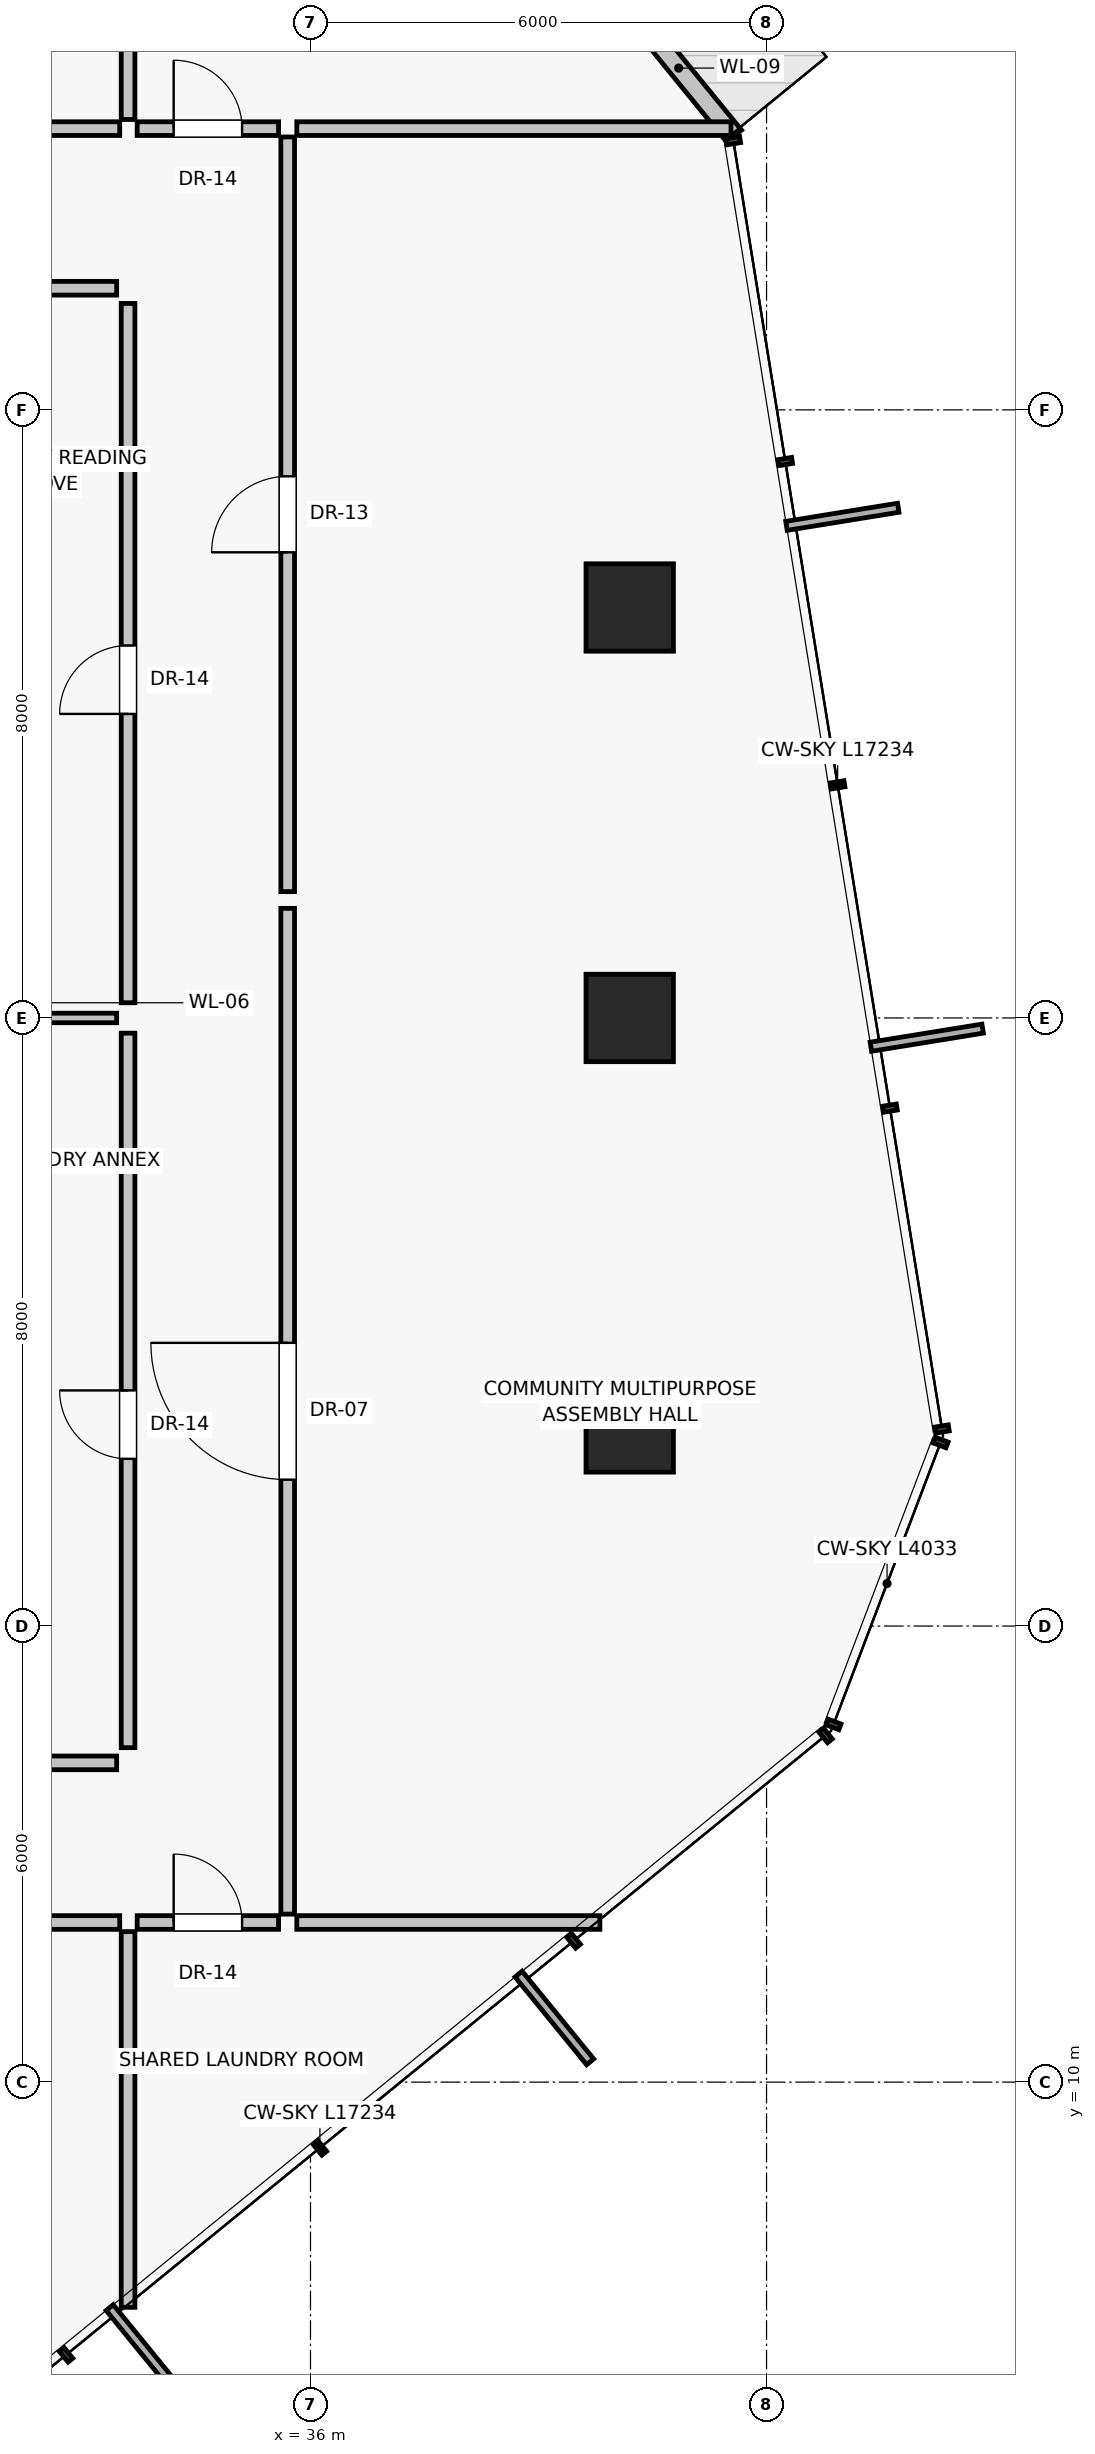
"""IFC4 building model, lengths in metres.
Left out: names, types, materials, properties, quantities, classifications, styles, units other than length and angle.
Written with IfcOpenShell. Run it as: python <this file> out.ifc"""

import sys

from ifc_helpers import new_model, si_unit, direction, frame, frame_2d, origin, origin_2d, place, context, subcontext, project, spatial, rectangle, extrude, source, transform, mapped, element, fill, save


model = new_model("IFC4")
c1 = context("Model", 3, precision=1e-05, world=origin(), true_north=direction((0.0, 1.0)))
c2 = subcontext(c1, "Body", "Model", "MODEL_VIEW")
j1 = project(units=[si_unit("LENGTHUNIT", "METRE"), si_unit("PLANEANGLEUNIT", "RADIAN")], contexts=[c1])
p1 = place(None, origin())
s1 = spatial("IfcSite", under=j1, at=p1, CompositionType="ELEMENT")
p2 = place(p1, origin())
s2 = spatial("IfcBuilding", under=s1, at=p2, CompositionType="ELEMENT")
p3 = place(p2, frame((0.0, 0.0, 158.75)))
s3 = spatial("IfcBuildingStorey", under=s2, at=p3, CompositionType="ELEMENT", Elevation=158.75)
for number, where, z_axis, x_axis in (
    (1, (40.2, 18.6, 0.0), (0.0, 0.0, 1.0), (1.0, 0.0, 0.0)),
    (2, (40.2, 24.0, 0.0), (0.0, 0.0, 1.0), (1.0, 0.0, 0.0)),
    (3, (40.2, 29.4, 0.0), (0.0, 0.0, 1.0), (1.0, 0.0, 0.0)),
):
    element("IfcColumn", number, at=place(p3, frame(where, z_axis=z_axis, x_axis=x_axis)), inside=s3, PredefinedType="COLUMN", context=c2, shape_type="SweptSolid", body=[
        extrude(rectangle(XDim=1.15, YDim=1.15, at=origin_2d()), origin(), (0.0, 0.0, 1.0), 4.3),
    ])
p4 = place(p3, frame((41.574, 35.602, 0.0), z_axis=(0.0, 0.0, 1.0), x_axis=(-0.632059289804, 0.774920030824, 0.0)))
e4 = element("IfcWall", 4, at=p4, inside=s3, PredefinedType="SOLIDWALL", context=c2, shape_type="SweptSolid", body=[
    extrude(rectangle(XDim=4.233, YDim=0.25, at=frame_2d((2.117, 0.0))), origin(), (0.0, 0.0, 1.0), 4.05),
])
p5 = place(p4, frame((2.56, 0.0, 0.0)))
e5 = element("IfcOpeningElement", 5, at=p5, cuts=e4, PredefinedType="OPENING", context=c2, shape_type="SweptSolid", body=[
    extrude(rectangle(XDim=1.15, YDim=2.25, at=frame_2d((0.575, 1.125))), frame((0.0, 0.135, 0.0), z_axis=(0.0, -1.0, 0.0), x_axis=(1.0, 0.0, 0.0)), (0.0, 0.0, 1.0), 0.27),
])
p6 = place(p3, frame((33.6, 14.4, 0.0), z_axis=(0.0, 0.0, 1.0), x_axis=(0.0, 1.0, 0.0)))
e6 = element("IfcWall", 6, at=p6, inside=s3, PredefinedType="PARTITIONING", context=c2, shape_type="SweptSolid", body=[
    extrude(rectangle(XDim=9.4, YDim=0.18, at=frame_2d((4.7, 0.0))), origin(), (0.0, 0.0, 1.0), 4.05),
])
p7 = place(p6, frame((3.8, 0.0, 0.0)))
e7 = element("IfcOpeningElement", 7, at=p7, cuts=e6, PredefinedType="OPENING", context=c2, shape_type="SweptSolid", body=[
    extrude(rectangle(XDim=0.9, YDim=2.01, at=frame_2d((0.45, 1.005))), frame((0.0, 0.1, 0.0), z_axis=(0.0, -1.0, 0.0), x_axis=(1.0, 0.0, 0.0)), (0.0, 0.0, 1.0), 0.2),
])
p8 = place(p3, frame((33.6, 24.2, 0.0), z_axis=(0.0, 0.0, 1.0), x_axis=(0.0, 1.0, 0.0)))
e8 = element("IfcWall", 8, at=p8, inside=s3, PredefinedType="PARTITIONING", context=c2, shape_type="SweptSolid", body=[
    extrude(rectangle(XDim=9.2, YDim=0.18, at=frame_2d((4.6, 0.0))), origin(), (0.0, 0.0, 1.0), 4.05),
])
p9 = place(p8, frame((3.8, 0.0, 0.0)))
e9 = element("IfcOpeningElement", 9, at=p9, cuts=e8, PredefinedType="OPENING", context=c2, shape_type="SweptSolid", body=[
    extrude(rectangle(XDim=0.9, YDim=2.01, at=frame_2d((0.45, 1.005))), frame((0.0, 0.1, 0.0), z_axis=(0.0, -1.0, 0.0), x_axis=(1.0, 0.0, 0.0)), (0.0, 0.0, 1.0), 0.2),
])
p10 = place(p3, frame((31.35, 24.0, 0.0), z_axis=(0.0, 0.0, 1.0), x_axis=(1.0, 0.0, 0.0)))
e10 = element("IfcWall", 10, at=p10, inside=s3, PredefinedType="PARTITIONING", context=c2, shape_type="SweptSolid", body=[
    extrude(rectangle(XDim=2.1, YDim=0.125, at=frame_2d((1.05, 0.0))), origin(), (0.0, 0.0, 1.0), 4.05),
])
for number, where, z_axis, x_axis in (
    (11, (30.9, 14.2, 0.0), (0.0, 0.0, 1.0), (1.0, 0.0, 0.0)),
    (12, (30.9, 33.6, 0.0), (0.0, 0.0, 1.0), (1.0, 0.0, 0.0)),
):
    element("IfcWall", number, at=place(p3, frame(where, z_axis=z_axis, x_axis=x_axis)), inside=s3, PredefinedType="PARTITIONING", context=c2, shape_type="SweptSolid", body=[
        extrude(rectangle(XDim=2.55, YDim=0.18, at=frame_2d((1.275, 0.0))), origin(), (0.0, 0.0, 1.0), 4.05),
    ])
p11 = place(p3, frame((33.6, 11.98, 0.0), z_axis=(0.0, 0.0, 1.0), x_axis=(0.0, -1.0, 0.0)))
e13 = element("IfcWall", 13, at=p11, inside=s3, PredefinedType="PARTITIONING", context=c2, shape_type="SweptSolid", body=[
    extrude(rectangle(XDim=4.942, YDim=0.18, at=frame_2d((2.471, 0.0))), origin(), (0.0, 0.0, 1.0), 4.05),
])
p12 = place(p3, frame((25.454, 12.1, 0.0), z_axis=(0.0, 0.0, 1.0), x_axis=(1.0, 0.0, 0.0)))
e14 = element("IfcWall", 14, at=p12, inside=s3, PredefinedType="PARTITIONING", context=c2, shape_type="SweptSolid", body=[
    extrude(rectangle(XDim=8.036, YDim=0.18, at=frame_2d((4.018, 0.0))), origin(), (0.0, 0.0, 1.0), 3.63),
])
p13 = place(p12, frame((3.518, 0.0, 0.0)))
e15 = element("IfcOpeningElement", 15, at=p13, cuts=e14, PredefinedType="OPENING", context=c2, shape_type="SweptSolid", body=[
    extrude(rectangle(XDim=1.0, YDim=2.01, at=frame_2d((0.5, 1.005))), frame((0.0, 0.1, 0.0), z_axis=(0.0, -1.0, 0.0), x_axis=(1.0, 0.0, 0.0)), (0.0, 0.0, 1.0), 0.2),
])
p14 = place(p3, frame((33.6, 35.82, 0.0), z_axis=(0.0, 0.0, 1.0), x_axis=(0.0, 1.0, 0.0)))
e16 = element("IfcWall", 16, at=p14, inside=s3, PredefinedType="PARTITIONING", context=c2, shape_type="SweptSolid", body=[
    extrude(rectangle(XDim=5.085, YDim=0.18, at=frame_2d((2.542, 0.0))), origin(), (0.0, 0.0, 1.0), 4.05),
])
p15 = place(p3, frame((24.11, 35.7, 0.0), z_axis=(0.0, 0.0, 1.0), x_axis=(1.0, 0.0, 0.0)))
e17 = element("IfcWall", 17, at=p15, inside=s3, PredefinedType="PARTITIONING", context=c2, shape_type="SweptSolid", body=[
    extrude(rectangle(XDim=9.38, YDim=0.18, at=frame_2d((4.69, 0.0))), origin(), (0.0, 0.0, 1.0), 3.63),
])
p16 = place(p15, frame((4.19, 0.0, 0.0)))
e18 = element("IfcOpeningElement", 18, at=p16, cuts=e17, PredefinedType="OPENING", context=c2, shape_type="SweptSolid", body=[
    extrude(rectangle(XDim=1.0, YDim=2.01, at=frame_2d((0.5, 1.005))), frame((0.0, 0.1, 0.0), z_axis=(0.0, -1.0, 0.0), x_axis=(1.0, 0.0, 0.0)), (0.0, 0.0, 1.0), 0.2),
])
p17 = place(p3, frame((35.82, 12.1, 0.0), z_axis=(0.0, 0.0, 1.0), x_axis=(1.0, 0.0, 0.0)))
e19 = element("IfcWall", 19, at=p17, inside=s3, PredefinedType="PARTITIONING", context=c2, shape_type="SweptSolid", body=[
    extrude(rectangle(XDim=3.987, YDim=0.18, at=frame_2d((1.994, 0.0))), origin(), (0.0, 0.0, 1.0), 4.05),
])
p18 = place(p3, frame((35.82, 35.7, 0.0), z_axis=(0.0, 0.0, 1.0), x_axis=(1.0, 0.0, 0.0)))
e20 = element("IfcWall", 20, at=p18, inside=s3, PredefinedType="PARTITIONING", context=c2, shape_type="SweptSolid", body=[
    extrude(rectangle(XDim=5.712, YDim=0.18, at=frame_2d((2.856, 0.0))), origin(), (0.0, 0.0, 1.0), 4.05),
])
p19 = place(p3, frame((35.7, 12.21, 0.0), z_axis=(0.0, 0.0, 1.0), x_axis=(0.0, 1.0, 0.0)))
e21 = element("IfcWall", 21, at=p19, inside=s3, PredefinedType="PARTITIONING", context=c2, shape_type="SweptSolid", body=[
    extrude(rectangle(XDim=13.232, YDim=0.18, at=frame_2d((6.616, 0.0))), origin(), (0.0, 0.0, 1.0), 3.63),
])
p20 = place(p19, frame((5.716, 0.0, 0.0)))
e22 = element("IfcOpeningElement", 22, at=p20, cuts=e21, PredefinedType="OPENING", context=c2, shape_type="SweptSolid", body=[
    extrude(rectangle(XDim=1.8, YDim=2.25, at=frame_2d((0.9, 1.125))), frame((0.0, 0.1, 0.0), z_axis=(0.0, -1.0, 0.0), x_axis=(1.0, 0.0, 0.0)), (0.0, 0.0, 1.0), 0.2),
])
p21 = place(p3, frame((35.7, 25.662, 0.0), z_axis=(0.0, 0.0, 1.0), x_axis=(0.0, 1.0, 0.0)))
e23 = element("IfcWall", 23, at=p21, inside=s3, PredefinedType="PARTITIONING", context=c2, shape_type="SweptSolid", body=[
    extrude(rectangle(XDim=9.928, YDim=0.18, at=frame_2d((4.964, 0.0))), origin(), (0.0, 0.0, 1.0), 3.63),
])
p22 = place(p21, frame((4.464, 0.0, 0.0)))
e24 = element("IfcOpeningElement", 24, at=p22, cuts=e23, PredefinedType="OPENING", context=c2, shape_type="SweptSolid", body=[
    extrude(rectangle(XDim=1.0, YDim=2.01, at=frame_2d((0.5, 1.005))), frame((0.0, 0.1, 0.0), z_axis=(0.0, -1.0, 0.0), x_axis=(1.0, 0.0, 0.0)), (0.0, 0.0, 1.0), 0.2),
])
p23 = place(p3, frame((33.72, 12.1, 0.0), z_axis=(0.0, 0.0, 1.0), x_axis=(1.0, 0.0, 0.0)))
e25 = element("IfcWall", 25, at=p23, inside=s3, PredefinedType="PARTITIONING", context=c2, shape_type="SweptSolid", body=[
    extrude(rectangle(XDim=1.86, YDim=0.18, at=frame_2d((0.93, 0.0))), origin(), (0.0, 0.0, 1.0), 4.05),
])
p24 = place(p23, frame((0.48, 0.0, 0.0)))
e26 = element("IfcOpeningElement", 26, at=p24, cuts=e25, PredefinedType="OPENING", context=c2, shape_type="SweptSolid", body=[
    extrude(rectangle(XDim=0.9, YDim=2.01, at=frame_2d((0.45, 1.005))), frame((0.0, 0.1, 0.0), z_axis=(0.0, -1.0, 0.0), x_axis=(1.0, 0.0, 0.0)), (0.0, 0.0, 1.0), 0.2),
])
p25 = place(p3, frame((33.72, 35.7, 0.0), z_axis=(0.0, 0.0, 1.0), x_axis=(1.0, 0.0, 0.0)))
e27 = element("IfcWall", 27, at=p25, inside=s3, PredefinedType="PARTITIONING", context=c2, shape_type="SweptSolid", body=[
    extrude(rectangle(XDim=1.86, YDim=0.18, at=frame_2d((0.93, 0.0))), origin(), (0.0, 0.0, 1.0), 4.05),
])
p26 = place(p25, frame((0.48, 0.0, 0.0)))
e28 = element("IfcOpeningElement", 28, at=p26, cuts=e27, PredefinedType="OPENING", context=c2, shape_type="SweptSolid", body=[
    extrude(rectangle(XDim=0.9, YDim=2.01, at=frame_2d((0.45, 1.005))), frame((0.0, 0.1, 0.0), z_axis=(0.0, -1.0, 0.0), x_axis=(1.0, 0.0, 0.0)), (0.0, 0.0, 1.0), 0.2),
])
m1 = source(origin(), c2, "Body", "SweptSolid", [
    extrude(rectangle(XDim=0.9, YDim=2.01, at=frame_2d((0.45, 1.005))), frame((0.0, 0.025, 0.0), z_axis=(0.0, -1.0, 0.0), x_axis=(1.0, 0.0, 0.0)), (0.0, 0.0, 1.0), 0.05),
])
p27 = place(p7, origin())
e29 = element("IfcDoor", 29, at=p27, inside=s3, OperationType="SINGLE_SWING_RIGHT", PredefinedType="DOOR", context=c2, shape_type="MappedRepresentation", body=[
    mapped(m1, transform((0.0, 0.0, 0.0), scale=1.0)),
])
fill(e7, e29)
p28 = place(p9, origin())
e30 = element("IfcDoor", 30, at=p28, inside=s3, OperationType="SINGLE_SWING_LEFT", PredefinedType="DOOR", context=c2, shape_type="MappedRepresentation", body=[
    mapped(m1, transform((0.0, 0.0, 0.0), scale=1.0)),
])
fill(e9, e30)
m2 = source(origin(), c2, "Body", "SweptSolid", [
    extrude(rectangle(XDim=1.8, YDim=2.25, at=frame_2d((0.9, 1.125))), frame((0.0, 0.025, 0.0), z_axis=(0.0, -1.0, 0.0), x_axis=(1.0, 0.0, 0.0)), (0.0, 0.0, 1.0), 0.05),
])
p29 = place(p20, origin())
e31 = element("IfcDoor", 31, at=p29, inside=s3, OperationType="SINGLE_SWING_RIGHT", PredefinedType="DOOR", context=c2, shape_type="MappedRepresentation", body=[
    mapped(m2, transform((0.0, 0.0, 0.0), scale=1.0)),
])
fill(e22, e31)
m3 = source(origin(), c2, "Body", "SweptSolid", [
    extrude(rectangle(XDim=1.0, YDim=2.01, at=frame_2d((0.5, 1.005))), frame((0.0, 0.025, 0.0), z_axis=(0.0, -1.0, 0.0), x_axis=(1.0, 0.0, 0.0)), (0.0, 0.0, 1.0), 0.05),
])
p30 = place(p22, origin())
e32 = element("IfcDoor", 32, at=p30, inside=s3, OperationType="SINGLE_SWING_LEFT", PredefinedType="DOOR", context=c2, shape_type="MappedRepresentation", body=[
    mapped(m3, transform((0.0, 0.0, 0.0), scale=1.0)),
])
fill(e24, e32)
p31 = place(p24, origin())
e33 = element("IfcDoor", 33, at=p31, inside=s3, OperationType="SINGLE_SWING_LEFT", PredefinedType="DOOR", context=c2, shape_type="MappedRepresentation", body=[
    mapped(m1, transform((0.0, 0.0, 0.0), scale=1.0)),
])
fill(e26, e33)
p32 = place(p26, origin())
e34 = element("IfcDoor", 34, at=p32, inside=s3, OperationType="SINGLE_SWING_LEFT", PredefinedType="DOOR", context=c2, shape_type="MappedRepresentation", body=[
    mapped(m1, transform((0.0, 0.0, 0.0), scale=1.0)),
])
fill(e28, e34)
save(model, sys.argv[1])
